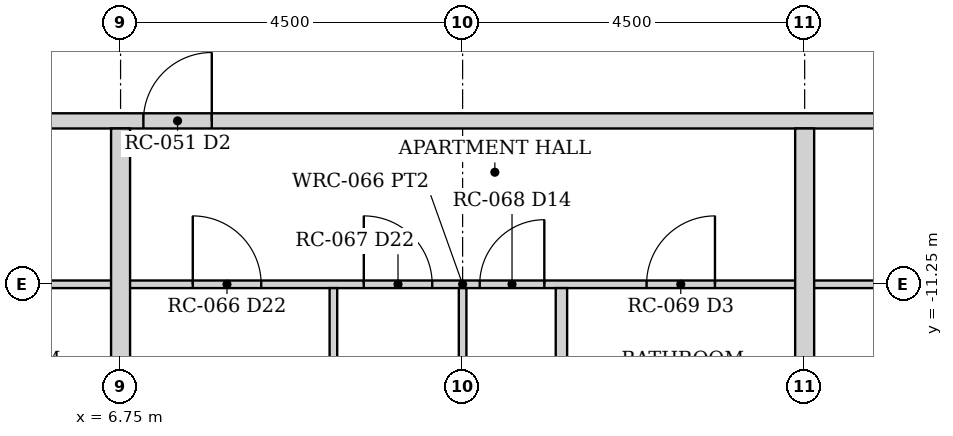
"""IFC4 building model, lengths in metres.
Left out: names, types, materials, properties, quantities, classifications, styles, units other than length and angle.
Written with IfcOpenShell. Run it as: python <this file> out.ifc"""

import sys

from ifc_helpers import new_model, si_unit, direction, frame, frame_2d, origin, place, context, subcontext, project, spatial, rectangle, extrude, element, fill, save


model = new_model("IFC4")
c1 = context("Model", 3, precision=1e-05, world=origin(), true_north=direction((0.0, 1.0)))
c2 = subcontext(c1, "Body", "Model", "MODEL_VIEW")
j1 = project(units=[si_unit("LENGTHUNIT", "METRE"), si_unit("PLANEANGLEUNIT", "RADIAN")], contexts=[c1])
p1 = place(None, origin())
s1 = spatial("IfcSite", under=j1, at=p1, CompositionType="ELEMENT")
p2 = place(p1, origin())
s2 = spatial("IfcBuilding", under=s1, at=p2, CompositionType="ELEMENT")
p3 = place(p2, frame((0.0, 0.0, 47.5)))
s3 = spatial("IfcBuildingStorey", under=s2, at=p3, CompositionType="ELEMENT", Elevation=47.5)
p4 = place(p3, frame((-24.55, -9.1, 0.0), z_axis=(0.0, 0.0, 1.0), x_axis=(1.0, 0.0, 0.0)))
e1 = element("IfcWall", 1, at=p4, inside=s3, PredefinedType="PARTITIONING", context=c2, shape_type="SweptSolid", body=[
    extrude(rectangle(XDim=49.1, YDim=0.2, at=frame_2d((24.55, 0.0))), origin(), (0.0, 0.0, 1.0), 2.373),
])
p5 = place(p4, frame((5.1, 0.0, 0.0)))
e2 = element("IfcOpeningElement", 2, at=p5, cuts=e1, PredefinedType="OPENING", context=c2, shape_type="SweptSolid", body=[
    extrude(rectangle(XDim=0.9, YDim=2.1, at=frame_2d((0.45, 1.05))), frame((0.0, 0.11, 0.0), z_axis=(0.0, -1.0, 0.0), x_axis=(1.0, 0.0, 0.0)), (0.0, 0.0, 1.0), 0.22),
])
p6 = place(p4, frame((13.6, 0.0, 0.0)))
e3 = element("IfcOpeningElement", 3, at=p6, cuts=e1, PredefinedType="OPENING", context=c2, shape_type="SweptSolid", body=[
    extrude(rectangle(XDim=0.9, YDim=2.1, at=frame_2d((0.45, 1.05))), frame((0.0, 0.11, 0.0), z_axis=(0.0, -1.0, 0.0), x_axis=(1.0, 0.0, 0.0)), (0.0, 0.0, 1.0), 0.22),
])
p7 = place(p4, frame((18.1, 0.0, 0.0)))
e4 = element("IfcOpeningElement", 4, at=p7, cuts=e1, PredefinedType="OPENING", context=c2, shape_type="SweptSolid", body=[
    extrude(rectangle(XDim=0.9, YDim=2.1, at=frame_2d((0.45, 1.05))), frame((0.0, 0.11, 0.0), z_axis=(0.0, -1.0, 0.0), x_axis=(1.0, 0.0, 0.0)), (0.0, 0.0, 1.0), 0.22),
])
p8 = place(p4, frame((31.6, 0.0, 0.0)))
e5 = element("IfcOpeningElement", 5, at=p8, cuts=e1, PredefinedType="OPENING", context=c2, shape_type="SweptSolid", body=[
    extrude(rectangle(XDim=0.9, YDim=2.1, at=frame_2d((0.45, 1.05))), frame((0.0, 0.11, 0.0), z_axis=(0.0, -1.0, 0.0), x_axis=(1.0, 0.0, 0.0)), (0.0, 0.0, 1.0), 0.22),
])
p9 = place(p4, frame((43.1, 0.0, 0.0)))
e6 = element("IfcOpeningElement", 6, at=p9, cuts=e1, PredefinedType="OPENING", context=c2, shape_type="SweptSolid", body=[
    extrude(rectangle(XDim=0.9, YDim=2.1, at=frame_2d((0.45, 1.05))), frame((0.0, 0.11, 0.0), z_axis=(0.0, -1.0, 0.0), x_axis=(1.0, 0.0, 0.0)), (0.0, 0.0, 1.0), 0.22),
])
p10 = place(p3, frame((-6.65, -11.25, 0.0), z_axis=(0.0, 0.0, 1.0), x_axis=(1.0, 0.0, 0.0)))
e7 = element("IfcWall", 7, at=p10, inside=s3, PredefinedType="PARTITIONING", context=c2, shape_type="SweptSolid", body=[
    extrude(rectangle(XDim=13.3, YDim=0.1, at=frame_2d((6.65, 0.0))), origin(), (0.0, 0.0, 1.0), 2.373),
])
p11 = place(p10, frame((0.85, 0.0, 0.0)))
e8 = element("IfcOpeningElement", 8, at=p11, cuts=e7, PredefinedType="OPENING", context=c2, shape_type="SweptSolid", body=[
    extrude(rectangle(XDim=0.9, YDim=2.1, at=frame_2d((0.45, 1.05))), frame((0.0, 0.06, 0.0), z_axis=(0.0, -1.0, 0.0), x_axis=(1.0, 0.0, 0.0)), (0.0, 0.0, 1.0), 0.12),
])
p12 = place(p10, frame((3.1, 0.0, 0.0)))
e9 = element("IfcOpeningElement", 9, at=p12, cuts=e7, PredefinedType="OPENING", context=c2, shape_type="SweptSolid", body=[
    extrude(rectangle(XDim=0.9, YDim=2.1, at=frame_2d((0.45, 1.05))), frame((0.0, 0.06, 0.0), z_axis=(0.0, -1.0, 0.0), x_axis=(1.0, 0.0, 0.0)), (0.0, 0.0, 1.0), 0.12),
])
p13 = place(p10, frame((4.625, 0.0, 0.0)))
e10 = element("IfcOpeningElement", 10, at=p13, cuts=e7, PredefinedType="OPENING", context=c2, shape_type="SweptSolid", body=[
    extrude(rectangle(XDim=0.85, YDim=2.1, at=frame_2d((0.425, 1.05))), frame((0.0, 0.06, 0.0), z_axis=(0.0, -1.0, 0.0), x_axis=(1.0, 0.0, 0.0)), (0.0, 0.0, 1.0), 0.12),
])
p14 = place(p10, frame((6.82, 0.0, 0.0)))
e11 = element("IfcOpeningElement", 11, at=p14, cuts=e7, PredefinedType="OPENING", context=c2, shape_type="SweptSolid", body=[
    extrude(rectangle(XDim=0.9, YDim=2.1, at=frame_2d((0.45, 1.05))), frame((0.0, 0.06, 0.0), z_axis=(0.0, -1.0, 0.0), x_axis=(1.0, 0.0, 0.0)), (0.0, 0.0, 1.0), 0.12),
])
p15 = place(p10, frame((9.125, 0.0, 0.0)))
e12 = element("IfcOpeningElement", 12, at=p15, cuts=e7, PredefinedType="OPENING", context=c2, shape_type="SweptSolid", body=[
    extrude(rectangle(XDim=0.85, YDim=2.1, at=frame_2d((0.425, 1.05))), frame((0.0, 0.06, 0.0), z_axis=(0.0, -1.0, 0.0), x_axis=(1.0, 0.0, 0.0)), (0.0, 0.0, 1.0), 0.12),
])
p16 = place(p3, frame((6.85, -11.25, 0.0), z_axis=(0.0, 0.0, 1.0), x_axis=(1.0, 0.0, 0.0)))
e13 = element("IfcWall", 13, at=p16, inside=s3, PredefinedType="PARTITIONING", context=c2, shape_type="SweptSolid", body=[
    extrude(rectangle(XDim=8.8, YDim=0.1, at=frame_2d((4.4, 0.0))), origin(), (0.0, 0.0, 1.0), 2.373),
])
p17 = place(p16, frame((0.85, 0.0, 0.0)))
e14 = element("IfcOpeningElement", 14, at=p17, cuts=e13, PredefinedType="OPENING", context=c2, shape_type="SweptSolid", body=[
    extrude(rectangle(XDim=0.9, YDim=2.1, at=frame_2d((0.45, 1.05))), frame((0.0, 0.06, 0.0), z_axis=(0.0, -1.0, 0.0), x_axis=(1.0, 0.0, 0.0)), (0.0, 0.0, 1.0), 0.12),
])
p18 = place(p16, frame((3.1, 0.0, 0.0)))
e15 = element("IfcOpeningElement", 15, at=p18, cuts=e13, PredefinedType="OPENING", context=c2, shape_type="SweptSolid", body=[
    extrude(rectangle(XDim=0.9, YDim=2.1, at=frame_2d((0.45, 1.05))), frame((0.0, 0.06, 0.0), z_axis=(0.0, -1.0, 0.0), x_axis=(1.0, 0.0, 0.0)), (0.0, 0.0, 1.0), 0.12),
])
p19 = place(p16, frame((4.625, 0.0, 0.0)))
e16 = element("IfcOpeningElement", 16, at=p19, cuts=e13, PredefinedType="OPENING", context=c2, shape_type="SweptSolid", body=[
    extrude(rectangle(XDim=0.85, YDim=2.1, at=frame_2d((0.425, 1.05))), frame((0.0, 0.06, 0.0), z_axis=(0.0, -1.0, 0.0), x_axis=(1.0, 0.0, 0.0)), (0.0, 0.0, 1.0), 0.12),
])
p20 = place(p16, frame((6.82, 0.0, 0.0)))
e17 = element("IfcOpeningElement", 17, at=p20, cuts=e13, PredefinedType="OPENING", context=c2, shape_type="SweptSolid", body=[
    extrude(rectangle(XDim=0.9, YDim=2.1, at=frame_2d((0.45, 1.05))), frame((0.0, 0.06, 0.0), z_axis=(0.0, -1.0, 0.0), x_axis=(1.0, 0.0, 0.0)), (0.0, 0.0, 1.0), 0.12),
])
p21 = place(p3, frame((9.55, -15.35, 0.0), z_axis=(0.0, 0.0, 1.0), x_axis=(0.0, 1.0, 0.0)))
e18 = element("IfcWall", 18, at=p21, inside=s3, PredefinedType="PARTITIONING", context=c2, shape_type="SweptSolid", body=[
    extrude(rectangle(XDim=4.05, YDim=0.1, at=frame_2d((2.025, 0.0))), origin(), (0.0, 0.0, 1.0), 2.373),
])
p22 = place(p3, frame((11.25, -24.35, 0.0), z_axis=(0.0, 0.0, 1.0), x_axis=(0.0, 1.0, 0.0)))
e19 = element("IfcWall", 19, at=p22, inside=s3, PredefinedType="PARTITIONING", context=c2, shape_type="SweptSolid", body=[
    extrude(rectangle(XDim=13.05, YDim=0.1, at=frame_2d((6.525, 0.0))), origin(), (0.0, 0.0, 1.0), 2.373),
])
p23 = place(p3, frame((12.55, -14.4, 0.0), z_axis=(0.0, 0.0, 1.0), x_axis=(0.0, 1.0, 0.0)))
e20 = element("IfcWall", 20, at=p23, inside=s3, PredefinedType="PARTITIONING", context=c2, shape_type="SweptSolid", body=[
    extrude(rectangle(XDim=3.1, YDim=0.15, at=frame_2d((1.55, 0.0))), origin(), (0.0, 0.0, 1.0), 2.373),
])
p24 = place(p23, frame((1.15, 0.0, 0.0)))
e21 = element("IfcOpeningElement", 21, at=p24, cuts=e20, PredefinedType="OPENING", context=c2, shape_type="SweptSolid", body=[
    extrude(rectangle(XDim=0.9, YDim=2.1, at=frame_2d((0.45, 1.05))), frame((0.0, 0.085, 0.0), z_axis=(0.0, -1.0, 0.0), x_axis=(1.0, 0.0, 0.0)), (0.0, 0.0, 1.0), 0.17),
])
p25 = place(p3, frame((15.85, -11.25, 0.0), z_axis=(0.0, 0.0, 1.0), x_axis=(1.0, 0.0, 0.0)))
e22 = element("IfcWall", 22, at=p25, inside=s3, PredefinedType="PARTITIONING", context=c2, shape_type="SweptSolid", body=[
    extrude(rectangle(XDim=8.5, YDim=0.1, at=frame_2d((4.25, 0.0))), origin(), (0.0, 0.0, 1.0), 2.373),
])
p26 = place(p25, frame((5.225, 0.0, 0.0)))
e23 = element("IfcOpeningElement", 23, at=p26, cuts=e22, PredefinedType="OPENING", context=c2, shape_type="SweptSolid", body=[
    extrude(rectangle(XDim=0.9, YDim=2.1, at=frame_2d((0.45, 1.05))), frame((0.0, 0.06, 0.0), z_axis=(0.0, -1.0, 0.0), x_axis=(1.0, 0.0, 0.0)), (0.0, 0.0, 1.0), 0.12),
])
p27 = place(p25, frame((7.25, 0.0, 0.0)))
e24 = element("IfcOpeningElement", 24, at=p27, cuts=e22, PredefinedType="OPENING", context=c2, shape_type="SweptSolid", body=[
    extrude(rectangle(XDim=0.9, YDim=2.1, at=frame_2d((0.45, 1.05))), frame((0.0, 0.06, 0.0), z_axis=(0.0, -1.0, 0.0), x_axis=(1.0, 0.0, 0.0)), (0.0, 0.0, 1.0), 0.12),
])
p28 = place(p25, frame((3.325, 0.0, 0.0)))
e25 = element("IfcOpeningElement", 25, at=p28, cuts=e22, PredefinedType="OPENING", context=c2, shape_type="SweptSolid", body=[
    extrude(rectangle(XDim=0.85, YDim=2.1, at=frame_2d((0.425, 1.05))), frame((0.0, 0.06, 0.0), z_axis=(0.0, -1.0, 0.0), x_axis=(1.0, 0.0, 0.0)), (0.0, 0.0, 1.0), 0.12),
])
p29 = place(p25, frame((1.08, 0.0, 0.0)))
e26 = element("IfcOpeningElement", 26, at=p29, cuts=e22, PredefinedType="OPENING", context=c2, shape_type="SweptSolid", body=[
    extrude(rectangle(XDim=0.9, YDim=2.1, at=frame_2d((0.45, 1.05))), frame((0.0, 0.06, 0.0), z_axis=(0.0, -1.0, 0.0), x_axis=(1.0, 0.0, 0.0)), (0.0, 0.0, 1.0), 0.12),
])
for number, where, z_axis, x_axis in (
    (27, (6.75, -24.35, 0.0), (0.0, 0.0, 1.0), (0.0, 1.0, 0.0)),
    (28, (15.75, -24.35, 0.0), (0.0, 0.0, 1.0), (0.0, 1.0, 0.0)),
):
    element("IfcWall", number, at=place(p3, frame(where, z_axis=z_axis, x_axis=x_axis)), inside=s3, PredefinedType="PARTITIONING", context=c2, shape_type="SweptSolid", body=[
        extrude(rectangle(XDim=15.15, YDim=0.25, at=frame_2d((7.575, 0.0))), origin(), (0.0, 0.0, 1.0), 2.373),
    ])
p30 = place(p8, origin())
e29 = element("IfcDoor", 29, at=p30, inside=s3, OperationType="SINGLE_SWING_RIGHT", PredefinedType="DOOR", context=c2, shape_type="SweptSolid", body=[
    extrude(rectangle(XDim=0.9, YDim=2.1, at=frame_2d((0.45, 1.05))), frame((0.0, 0.025, 0.0), z_axis=(0.0, -1.0, 0.0), x_axis=(1.0, 0.0, 0.0)), (0.0, 0.0, 1.0), 0.05),
])
fill(e5, e29)
p31 = place(p17, origin())
e30 = element("IfcDoor", 30, at=p31, inside=s3, OperationType="SINGLE_SWING_LEFT", PredefinedType="DOOR", context=c2, shape_type="SweptSolid", body=[
    extrude(rectangle(XDim=0.9, YDim=2.1, at=frame_2d((0.45, 1.05))), frame((0.0, 0.025, 0.0), z_axis=(0.0, -1.0, 0.0), x_axis=(1.0, 0.0, 0.0)), (0.0, 0.0, 1.0), 0.05),
])
fill(e14, e30)
p32 = place(p18, origin())
e31 = element("IfcDoor", 31, at=p32, inside=s3, OperationType="SINGLE_SWING_LEFT", PredefinedType="DOOR", context=c2, shape_type="SweptSolid", body=[
    extrude(rectangle(XDim=0.9, YDim=2.1, at=frame_2d((0.45, 1.05))), frame((0.0, 0.025, 0.0), z_axis=(0.0, -1.0, 0.0), x_axis=(1.0, 0.0, 0.0)), (0.0, 0.0, 1.0), 0.05),
])
fill(e15, e31)
p33 = place(p19, origin())
e32 = element("IfcDoor", 32, at=p33, inside=s3, OperationType="SINGLE_SWING_RIGHT", PredefinedType="DOOR", context=c2, shape_type="SweptSolid", body=[
    extrude(rectangle(XDim=0.85, YDim=2.1, at=frame_2d((0.425, 1.05))), frame((0.0, 0.025, 0.0), z_axis=(0.0, -1.0, 0.0), x_axis=(1.0, 0.0, 0.0)), (0.0, 0.0, 1.0), 0.05),
])
fill(e16, e32)
p34 = place(p20, origin())
e33 = element("IfcDoor", 33, at=p34, inside=s3, OperationType="SINGLE_SWING_RIGHT", PredefinedType="DOOR", context=c2, shape_type="SweptSolid", body=[
    extrude(rectangle(XDim=0.9, YDim=2.1, at=frame_2d((0.45, 1.05))), frame((0.0, 0.025, 0.0), z_axis=(0.0, -1.0, 0.0), x_axis=(1.0, 0.0, 0.0)), (0.0, 0.0, 1.0), 0.05),
])
fill(e17, e33)
save(model, sys.argv[1])
